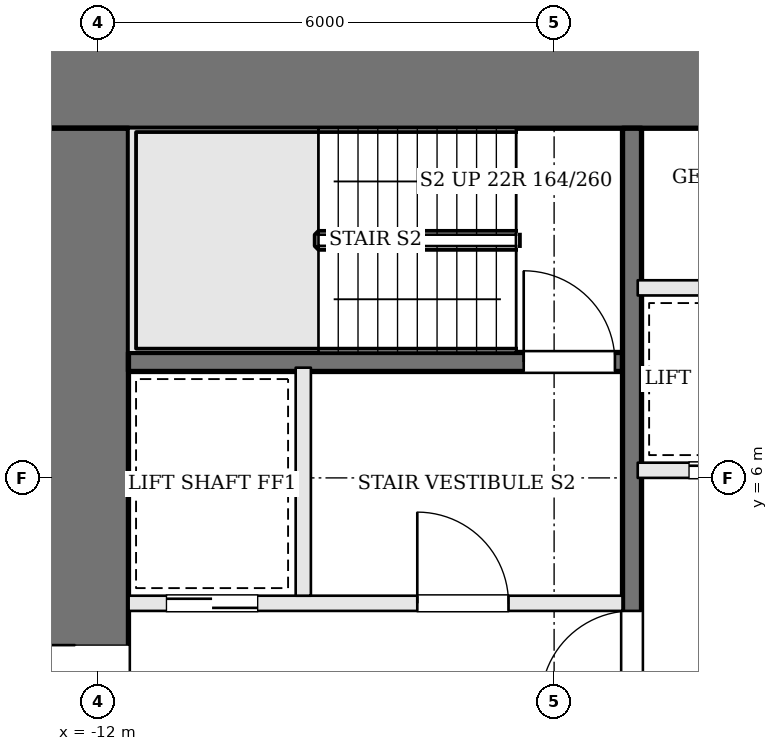
"""IFC4 building model, lengths in metres.
Left out: names, types, materials, properties, quantities, classifications, styles, units other than length and angle.
Written with IfcOpenShell. Run it as: python <this file> out.ifc"""

import sys

from ifc_helpers import new_model, si_unit, direction, frame, frame_2d, origin, place, context, subcontext, project, spatial, rectangle, extrude, element, fill, save


model = new_model("IFC4")
c1 = context("Model", 3, precision=1e-05, world=origin(), true_north=direction((0.0, 1.0)))
c2 = subcontext(c1, "Body", "Model", "MODEL_VIEW")
j1 = project(units=[si_unit("LENGTHUNIT", "METRE"), si_unit("PLANEANGLEUNIT", "RADIAN")], contexts=[c1])
p1 = place(None, origin())
s1 = spatial("IfcSite", under=j1, at=p1, CompositionType="ELEMENT")
p2 = place(p1, origin())
s2 = spatial("IfcBuilding", under=s1, at=p2, CompositionType="ELEMENT")
p3 = place(p2, frame((0.0, 0.0, 73.5)))
s3 = spatial("IfcBuildingStorey", under=s2, at=p3, CompositionType="ELEMENT", Elevation=73.5)
p4 = place(p3, frame((-13.0, 11.3, 0.0), z_axis=(0.0, 0.0, 1.0), x_axis=(1.0, 0.0, 0.0)))
e1 = element("IfcWall", 1, at=p4, inside=s3, PredefinedType="SHEAR", context=c2, shape_type="SweptSolid", body=[
    extrude(rectangle(XDim=26.0, YDim=1.4, at=frame_2d((13.0, 0.0))), origin(), (0.0, 0.0, 1.0), 3.6),
])
p5 = place(p4, frame((9.225, 0.0, 0.0)))
e2 = element("IfcOpeningElement", 2, at=p5, cuts=e1, PredefinedType="OPENING", context=c2, shape_type="SweptSolid", body=[
    extrude(rectangle(XDim=1.0, YDim=2.1, at=frame_2d((0.5, 1.05))), frame((0.0, 0.71, 0.0), z_axis=(0.0, -1.0, 0.0), x_axis=(1.0, 0.0, 0.0)), (0.0, 0.0, 1.0), 1.42),
])
p6 = place(p4, frame((11.825, 0.0, 0.0)))
e3 = element("IfcOpeningElement", 3, at=p6, cuts=e1, PredefinedType="OPENING", context=c2, shape_type="SweptSolid", body=[
    extrude(rectangle(XDim=0.7, YDim=2.1, at=frame_2d((0.35, 1.05))), frame((0.0, 0.71, 0.0), z_axis=(0.0, -1.0, 0.0), x_axis=(1.0, 0.0, 0.0)), (0.0, 0.0, 1.0), 1.42),
])
p7 = place(p4, frame((13.725, 0.0, 0.0)))
e4 = element("IfcOpeningElement", 4, at=p7, cuts=e1, PredefinedType="OPENING", context=c2, shape_type="SweptSolid", body=[
    extrude(rectangle(XDim=1.0, YDim=2.1, at=frame_2d((0.5, 1.05))), frame((0.0, 0.71, 0.0), z_axis=(0.0, -1.0, 0.0), x_axis=(1.0, 0.0, 0.0)), (0.0, 0.0, 1.0), 1.42),
])
p8 = place(p4, frame((16.225, 0.0, 0.0)))
e5 = element("IfcOpeningElement", 5, at=p8, cuts=e1, PredefinedType="OPENING", context=c2, shape_type="SweptSolid", body=[
    extrude(rectangle(XDim=0.9, YDim=2.1, at=frame_2d((0.45, 1.05))), frame((0.0, 0.71, 0.0), z_axis=(0.0, -1.0, 0.0), x_axis=(1.0, 0.0, 0.0)), (0.0, 0.0, 1.0), 1.42),
])
p9 = place(p3, frame((-12.3, -1.6, 0.0), z_axis=(0.0, 0.0, 1.0), x_axis=(0.0, 1.0, 0.0)))
e6 = element("IfcWall", 6, at=p9, inside=s3, PredefinedType="SHEAR", context=c2, shape_type="SweptSolid", body=[
    extrude(rectangle(XDim=12.2, YDim=1.4, at=frame_2d((6.1, 0.0))), origin(), (0.0, 0.0, 1.0), 3.6),
])
p10 = place(p9, frame((3.6, 0.0, 0.0)))
e7 = element("IfcOpeningElement", 7, at=p10, cuts=e6, PredefinedType="OPENING", context=c2, shape_type="SweptSolid", body=[
    extrude(rectangle(XDim=1.8, YDim=2.1, at=frame_2d((0.9, 1.05))), frame((0.0, 0.71, 0.0), z_axis=(0.0, -1.0, 0.0), x_axis=(1.0, 0.0, 0.0)), (0.0, 0.0, 1.0), 1.42),
])
p11 = place(p3, frame((-11.6, 4.35, 0.0), z_axis=(0.0, 0.0, 1.0), x_axis=(1.0, 0.0, 0.0)))
e8 = element("IfcWall", 8, at=p11, inside=s3, PredefinedType="SOLIDWALL", context=c2, shape_type="SweptSolid", body=[
    extrude(rectangle(XDim=6.5, YDim=0.2, at=frame_2d((3.25, 0.0))), origin(), (0.0, 0.0, 1.0), 3.3),
])
p12 = place(p11, frame((3.8, 0.0, 0.0)))
e9 = element("IfcOpeningElement", 9, at=p12, cuts=e8, PredefinedType="OPENING", context=c2, shape_type="SweptSolid", body=[
    extrude(rectangle(XDim=1.2, YDim=2.1, at=frame_2d((0.6, 1.05))), frame((0.0, 0.11, 0.0), z_axis=(0.0, -1.0, 0.0), x_axis=(1.0, 0.0, 0.0)), (0.0, 0.0, 1.0), 0.22),
])
p13 = place(p11, frame((0.5, 0.0, 0.0)))
e10 = element("IfcOpeningElement", 10, at=p13, cuts=e8, PredefinedType="OPENING", context=c2, shape_type="SweptSolid", body=[
    extrude(rectangle(XDim=1.2, YDim=2.1, at=frame_2d((0.6, 1.05))), frame((0.0, 0.11, 0.0), z_axis=(0.0, -1.0, 0.0), x_axis=(1.0, 0.0, 0.0)), (0.0, 0.0, 1.0), 0.22),
])
p14 = place(p3, frame((-11.6, 7.525, 0.0), z_axis=(0.0, 0.0, 1.0), x_axis=(1.0, 0.0, 0.0)))
e11 = element("IfcWall", 11, at=p14, inside=s3, PredefinedType="SOLIDWALL", context=c2, shape_type="SweptSolid", body=[
    extrude(rectangle(XDim=6.5, YDim=0.25, at=frame_2d((3.25, 0.0))), origin(), (0.0, 0.0, 1.0), 3.3),
])
p15 = place(p14, frame((5.2, 0.0, 0.0)))
e12 = element("IfcOpeningElement", 12, at=p15, cuts=e11, PredefinedType="OPENING", context=c2, shape_type="SweptSolid", body=[
    extrude(rectangle(XDim=1.2, YDim=2.1, at=frame_2d((0.6, 1.05))), frame((0.0, 0.135, 0.0), z_axis=(0.0, -1.0, 0.0), x_axis=(1.0, 0.0, 0.0)), (0.0, 0.0, 1.0), 0.27),
])
p16 = place(p3, frame((-9.3, 4.45, 0.0), z_axis=(0.0, 0.0, 1.0), x_axis=(0.0, 1.0, 0.0)))
e13 = element("IfcWall", 13, at=p16, inside=s3, PredefinedType="SOLIDWALL", context=c2, shape_type="SweptSolid", body=[
    extrude(rectangle(XDim=3.0, YDim=0.2, at=frame_2d((1.5, 0.0))), origin(), (0.0, 0.0, 1.0), 3.3),
])
p17 = place(p3, frame((-4.975, -1.6, 0.0), z_axis=(0.0, 0.0, 1.0), x_axis=(0.0, 1.0, 0.0)))
e14 = element("IfcWall", 14, at=p17, inside=s3, PredefinedType="SOLIDWALL", context=c2, shape_type="SweptSolid", body=[
    extrude(rectangle(XDim=12.2, YDim=0.25, at=frame_2d((6.1, 0.0))), origin(), (0.0, 0.0, 1.0), 3.3),
])
p18 = place(p17, frame((4.65, 0.0, 0.0)))
e15 = element("IfcOpeningElement", 15, at=p18, cuts=e14, PredefinedType="OPENING", context=c2, shape_type="SweptSolid", body=[
    extrude(rectangle(XDim=1.2, YDim=2.1, at=frame_2d((0.6, 1.05))), frame((0.0, 0.135, 0.0), z_axis=(0.0, -1.0, 0.0), x_axis=(1.0, 0.0, 0.0)), (0.0, 0.0, 1.0), 0.27),
])
p19 = place(p3, frame((-4.9, 6.1, 0.0), z_axis=(0.0, 0.0, 1.0), x_axis=(1.0, 0.0, 0.0)))
e16 = element("IfcWall", 16, at=p19, inside=s3, PredefinedType="SOLIDWALL", context=c2, shape_type="SweptSolid", body=[
    extrude(rectangle(XDim=9.8, YDim=0.2, at=frame_2d((4.9, 0.0))), origin(), (0.0, 0.0, 1.0), 3.3),
])
p20 = place(p19, frame((0.675, 0.0, 0.0)))
e17 = element("IfcOpeningElement", 17, at=p20, cuts=e16, PredefinedType="OPENING", context=c2, shape_type="SweptSolid", body=[
    extrude(rectangle(XDim=1.1, YDim=2.1, at=frame_2d((0.55, 1.05))), frame((0.0, 0.11, 0.0), z_axis=(0.0, -1.0, 0.0), x_axis=(1.0, 0.0, 0.0)), (0.0, 0.0, 1.0), 0.22),
])
p21 = place(p19, frame((3.125, 0.0, 0.0)))
e18 = element("IfcOpeningElement", 18, at=p21, cuts=e16, PredefinedType="OPENING", context=c2, shape_type="SweptSolid", body=[
    extrude(rectangle(XDim=1.1, YDim=2.1, at=frame_2d((0.55, 1.05))), frame((0.0, 0.11, 0.0), z_axis=(0.0, -1.0, 0.0), x_axis=(1.0, 0.0, 0.0)), (0.0, 0.0, 1.0), 0.22),
])
p22 = place(p19, frame((5.575, 0.0, 0.0)))
e19 = element("IfcOpeningElement", 19, at=p22, cuts=e16, PredefinedType="OPENING", context=c2, shape_type="SweptSolid", body=[
    extrude(rectangle(XDim=1.1, YDim=2.1, at=frame_2d((0.55, 1.05))), frame((0.0, 0.11, 0.0), z_axis=(0.0, -1.0, 0.0), x_axis=(1.0, 0.0, 0.0)), (0.0, 0.0, 1.0), 0.22),
])
p23 = place(p19, frame((8.025, 0.0, 0.0)))
e20 = element("IfcOpeningElement", 20, at=p23, cuts=e16, PredefinedType="OPENING", context=c2, shape_type="SweptSolid", body=[
    extrude(rectangle(XDim=1.1, YDim=2.1, at=frame_2d((0.55, 1.05))), frame((0.0, 0.11, 0.0), z_axis=(0.0, -1.0, 0.0), x_axis=(1.0, 0.0, 0.0)), (0.0, 0.0, 1.0), 0.22),
])
p24 = place(p3, frame((-4.9, 8.5, 0.0), z_axis=(0.0, 0.0, 1.0), x_axis=(1.0, 0.0, 0.0)))
e21 = element("IfcWall", 21, at=p24, inside=s3, PredefinedType="SOLIDWALL", context=c2, shape_type="SweptSolid", body=[
    extrude(rectangle(XDim=9.8, YDim=0.2, at=frame_2d((4.9, 0.0))), origin(), (0.0, 0.0, 1.0), 3.3),
])
p25 = place(p10, origin())
e22 = element("IfcDoor", 22, at=p25, inside=s3, OperationType="DOUBLE_DOOR_SINGLE_SWING", PredefinedType="DOOR", context=c2, shape_type="SweptSolid", body=[
    extrude(rectangle(XDim=1.8, YDim=2.1, at=frame_2d((0.9, 1.05))), frame((0.0, 0.025, 0.0), z_axis=(0.0, -1.0, 0.0), x_axis=(1.0, 0.0, 0.0)), (0.0, 0.0, 1.0), 0.05),
])
fill(e7, e22)
p26 = place(p18, origin())
e23 = element("IfcDoor", 23, at=p26, inside=s3, OperationType="SINGLE_SWING_LEFT", PredefinedType="DOOR", context=c2, shape_type="SweptSolid", body=[
    extrude(rectangle(XDim=1.2, YDim=2.1, at=frame_2d((0.6, 1.05))), frame((0.0, 0.025, 0.0), z_axis=(0.0, -1.0, 0.0), x_axis=(1.0, 0.0, 0.0)), (0.0, 0.0, 1.0), 0.05),
])
fill(e15, e23)
p27 = place(p12, origin())
e24 = element("IfcDoor", 24, at=p27, inside=s3, OperationType="SINGLE_SWING_LEFT", PredefinedType="DOOR", context=c2, shape_type="SweptSolid", body=[
    extrude(rectangle(XDim=1.2, YDim=2.1, at=frame_2d((0.6, 1.05))), frame((0.0, 0.025, 0.0), z_axis=(0.0, -1.0, 0.0), x_axis=(1.0, 0.0, 0.0)), (0.0, 0.0, 1.0), 0.05),
])
fill(e9, e24)
p28 = place(p15, origin())
e25 = element("IfcDoor", 25, at=p28, inside=s3, OperationType="SINGLE_SWING_LEFT", PredefinedType="DOOR", context=c2, shape_type="SweptSolid", body=[
    extrude(rectangle(XDim=1.2, YDim=2.1, at=frame_2d((0.6, 1.05))), frame((0.0, 0.025, 0.0), z_axis=(0.0, -1.0, 0.0), x_axis=(1.0, 0.0, 0.0)), (0.0, 0.0, 1.0), 0.05),
])
fill(e12, e25)
p29 = place(p13, origin())
e26 = element("IfcDoor", 26, at=p29, inside=s3, OperationType="SLIDING_TO_RIGHT", PredefinedType="DOOR", context=c2, shape_type="SweptSolid", body=[
    extrude(rectangle(XDim=1.2, YDim=2.1, at=frame_2d((0.6, 1.05))), frame((0.0, 0.025, 0.0), z_axis=(0.0, -1.0, 0.0), x_axis=(1.0, 0.0, 0.0)), (0.0, 0.0, 1.0), 0.05),
])
fill(e10, e26)
p30 = place(p20, origin())
e27 = element("IfcDoor", 27, at=p30, inside=s3, OperationType="SLIDING_TO_RIGHT", PredefinedType="DOOR", context=c2, shape_type="SweptSolid", body=[
    extrude(rectangle(XDim=1.1, YDim=2.1, at=frame_2d((0.55, 1.05))), frame((0.0, 0.025, 0.0), z_axis=(0.0, -1.0, 0.0), x_axis=(1.0, 0.0, 0.0)), (0.0, 0.0, 1.0), 0.05),
])
fill(e17, e27)
save(model, sys.argv[1])
